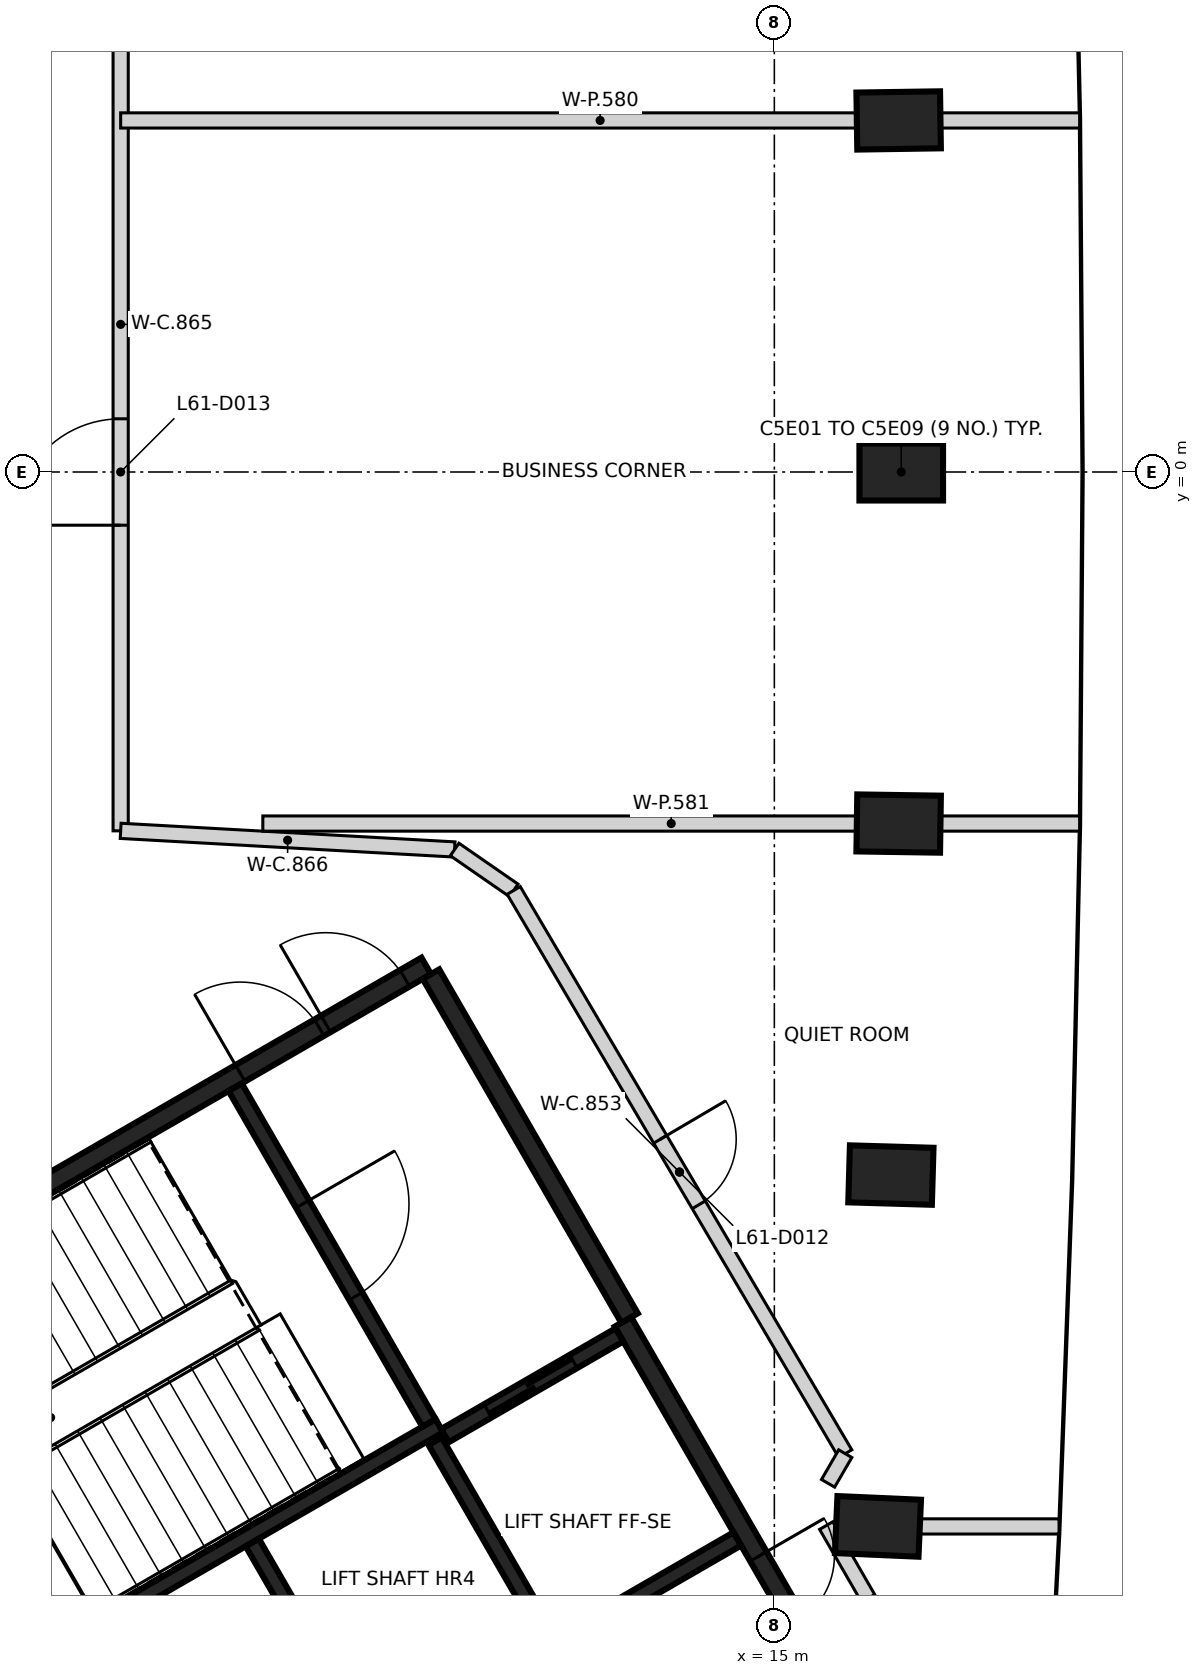
"""IFC4 building model, lengths in metres.
Left out: names, types, materials, properties, quantities, classifications, styles, units other than length and angle.
Written with IfcOpenShell. Run it as: python <this file> out.ifc"""

import sys

from ifc_helpers import new_model, si_unit, direction, frame, frame_2d, origin, origin_2d, place, context, subcontext, project, spatial, rectangle, extrude, element, fill, save


model = new_model("IFC4")
c1 = context("Model", 3, precision=1e-05, world=origin(), true_north=direction((0.0, 1.0)))
c2 = subcontext(c1, "Body", "Model", "MODEL_VIEW")
j1 = project(units=[si_unit("LENGTHUNIT", "METRE"), si_unit("PLANEANGLEUNIT", "RADIAN")], contexts=[c1])
p1 = place(None, origin())
s1 = spatial("IfcSite", under=j1, at=p1, CompositionType="ELEMENT")
p2 = place(p1, origin())
s2 = spatial("IfcBuilding", under=s1, at=p2, CompositionType="ELEMENT")
p3 = place(p2, frame((0.0, 0.0, 243.0)))
s3 = spatial("IfcBuildingStorey", under=s2, at=p3, CompositionType="ELEMENT", Elevation=243.0)
for number, where, z_axis, x_axis in (
    (1, (16.363, -13.872, -0.35), (0.0, 0.0, 1.0), (-0.999, 0.044, 0.0)),
    (2, (16.533, -9.25, -0.35), (0.0, 0.0, 1.0), (-1.0, 0.029, 0.0)),
    (3, (16.635, -4.625, -0.35), (0.0, 0.0, 1.0), (-1.0, 0.015, 0.0)),
    (4, (16.669, 0.0, -0.35), (0.0, 0.0, 1.0), (1.0, 0.0, 0.0)),
    (5, (16.635, 4.625, -0.35), (0.0, 0.0, 1.0), (1.0, 0.015, 0.0)),
):
    element("IfcColumn", number, at=place(p3, frame(where, z_axis=z_axis, x_axis=x_axis)), inside=s3, PredefinedType="COLUMN", context=c2, shape_type="SweptSolid", body=[
        extrude(rectangle(XDim=1.1, YDim=0.75, at=origin_2d()), origin(), (0.0, 0.0, 1.0), 3.6),
    ])
p4 = place(p3, frame((0.417, -12.273, 0.0), z_axis=(0.0, 0.0, 1.0), x_axis=(0.866021906294, 0.500006057782, 0.0)))
e6 = element("IfcWall", 6, at=p4, inside=s3, PredefinedType="SHEAR", context=c2, shape_type="SweptSolid", body=[
    extrude(rectangle(XDim=11.55, YDim=0.25, at=frame_2d((5.775, 0.0))), origin(), (0.0, 0.0, 1.0), 3.25),
])
p5 = place(p4, frame((10.025, 0.0, 0.0)))
e7 = element("IfcOpeningElement", 7, at=p5, cuts=e6, PredefinedType="OPENING", context=c2, shape_type="SweptSolid", body=[
    extrude(rectangle(XDim=1.2, YDim=2.1, at=frame_2d((0.6, 1.05))), frame((0.0, 0.135, 0.0), z_axis=(0.0, -1.0, 0.0), x_axis=(1.0, 0.0, 0.0)), (0.0, 0.0, 1.0), 0.27),
])
p6 = place(p4, frame((8.725, 0.0, 0.0)))
e8 = element("IfcOpeningElement", 8, at=p6, cuts=e6, PredefinedType="OPENING", context=c2, shape_type="SweptSolid", body=[
    extrude(rectangle(XDim=1.2, YDim=2.1, at=frame_2d((0.6, 1.05))), frame((0.0, 0.135, 0.0), z_axis=(0.0, -1.0, 0.0), x_axis=(1.0, 0.0, 0.0)), (0.0, 0.0, 1.0), 0.27),
])
p7 = place(p3, frame((13.008, -11.181, 0.0), z_axis=(0.0, 0.0, 1.0), x_axis=(0.500001955336, -0.866024274868, 0.0)))
e9 = element("IfcWall", 9, at=p7, inside=s3, PredefinedType="SHEAR", context=c2, shape_type="SweptSolid", body=[
    extrude(rectangle(XDim=6.125, YDim=0.25, at=frame_2d((3.062, 0.0))), origin(), (0.0, 0.0, 1.0), 3.25),
])
p8 = place(p7, frame((3.563, 0.0, 0.0)))
e10 = element("IfcOpeningElement", 10, at=p8, cuts=e9, PredefinedType="OPENING", context=c2, shape_type="SweptSolid", body=[
    extrude(rectangle(XDim=1.0, YDim=2.1, at=frame_2d((0.5, 1.05))), frame((0.0, 0.135, 0.0), z_axis=(0.0, -1.0, 0.0), x_axis=(1.0, 0.0, 0.0)), (0.0, 0.0, 1.0), 0.27),
])
p9 = place(p3, frame((10.483, -6.606, 0.0), z_axis=(0.0, 0.0, 1.0), x_axis=(0.49999885962, -0.866026062182, 0.0)))
e11 = element("IfcWall", 11, at=p9, inside=s3, PredefinedType="SHEAR", context=c2, shape_type="SweptSolid", body=[
    extrude(rectangle(XDim=5.225, YDim=0.25, at=frame_2d((2.612, 0.0))), origin(), (0.0, 0.0, 1.0), 3.25),
])
p10 = place(p3, frame((5.419, -15.534, 0.0), z_axis=(0.0, 0.0, 1.0), x_axis=(0.866029065029, 0.499993658486, 0.0)))
e12 = element("IfcWall", 12, at=p10, inside=s3, PredefinedType="SHEAR", context=c2, shape_type="SweptSolid", body=[
    extrude(rectangle(XDim=5.974, YDim=0.2, at=frame_2d((2.987, 0.0))), origin(), (0.0, 0.0, 1.0), 3.25),
])
p11 = place(p3, frame((7.906, -8.094, 0.0), z_axis=(0.0, 0.0, 1.0), x_axis=(0.500027839223, -0.866009330205, 0.0)))
e13 = element("IfcWall", 13, at=p11, inside=s3, PredefinedType="SHEAR", context=c2, shape_type="SweptSolid", body=[
    extrude(rectangle(XDim=5.098, YDim=0.2, at=frame_2d((2.549, 0.0))), origin(), (0.0, 0.0, 1.0), 3.25),
])
p12 = place(p11, frame((1.774, 0.0, 0.0)))
e14 = element("IfcOpeningElement", 14, at=p12, cuts=e13, PredefinedType="OPENING", context=c2, shape_type="SweptSolid", body=[
    extrude(rectangle(XDim=1.4, YDim=2.1, at=frame_2d((0.7, 1.05))), frame((0.0, 0.11, 0.0), z_axis=(0.0, -1.0, 0.0), x_axis=(1.0, 0.0, 0.0)), (0.0, 0.0, 1.0), 0.22),
])
p13 = place(p3, frame((8.132, -14.084, 0.0), z_axis=(0.0, 0.0, 1.0), x_axis=(0.499997778408, -0.866026686418, 0.0)))
e15 = element("IfcWall", 15, at=p13, inside=s3, PredefinedType="SHEAR", context=c2, shape_type="SweptSolid", body=[
    extrude(rectangle(XDim=3.198, YDim=0.2, at=frame_2d((1.599, 0.0))), origin(), (0.0, 0.0, 1.0), 3.25),
])
p14 = place(p3, frame((12.088, -15.437, 0.0), z_axis=(0.0, 0.0, 1.0), x_axis=(-0.500026960575, 0.86600983753, 0.0)))
e16 = element("IfcWall", 16, at=p14, inside=s3, PredefinedType="SHEAR", context=c2, shape_type="SweptSolid", body=[
    extrude(rectangle(XDim=3.1, YDim=0.2, at=frame_2d((1.55, 0.0))), origin(), (0.0, 0.0, 1.0), 3.25),
])
p15 = place(p3, frame((10.666, -12.678, 0.0), z_axis=(0.0, 0.0, 1.0), x_axis=(0.866018407898, 0.500012117035, 0.0)))
e17 = element("IfcWall", 17, at=p15, inside=s3, PredefinedType="SHEAR", context=c2, shape_type="SweptSolid", body=[
    extrude(rectangle(XDim=2.651, YDim=0.2, at=frame_2d((1.325, 0.0))), origin(), (0.0, 0.0, 1.0), 3.25),
])
p16 = place(p15, frame((0.652, 0.0, 0.0)))
e18 = element("IfcOpeningElement", 18, at=p16, cuts=e17, PredefinedType="OPENING", context=c2, shape_type="SweptSolid", body=[
    extrude(rectangle(XDim=1.3, YDim=2.1, at=frame_2d((0.65, 1.05))), frame((0.0, 0.11, 0.0), z_axis=(0.0, -1.0, 0.0), x_axis=(1.0, 0.0, 0.0)), (0.0, 0.0, 1.0), 0.22),
])
p17 = place(p3, frame((14.512, -14.037, 0.0), z_axis=(0.0, 0.0, 1.0), x_axis=(-0.866018407898, -0.500012117035, 0.0)))
e19 = element("IfcWall", 19, at=p17, inside=s3, PredefinedType="SHEAR", context=c2, shape_type="SweptSolid", body=[
    extrude(rectangle(XDim=2.651, YDim=0.2, at=frame_2d((1.325, 0.0))), origin(), (0.0, 0.0, 1.0), 3.25),
])
p18 = place(p3, frame((6.4, -4.721, 0.0), z_axis=(0.0, 0.0, 1.0), x_axis=(0.0, 1.0, 0.0)))
e20 = element("IfcWall", 20, at=p18, inside=s3, PredefinedType="PARTITIONING", context=c2, shape_type="SweptSolid", body=[
    extrude(rectangle(XDim=13.326, YDim=0.2, at=frame_2d((6.663, 0.0))), origin(), (0.0, 0.0, 1.0), 3.25),
])
p19 = place(p18, frame((4.021, 0.0, 0.0)))
e21 = element("IfcOpeningElement", 21, at=p19, cuts=e20, PredefinedType="OPENING", context=c2, shape_type="SweptSolid", body=[
    extrude(rectangle(XDim=1.4, YDim=2.1, at=frame_2d((0.7, 1.05))), frame((0.0, 0.11, 0.0), z_axis=(0.0, -1.0, 0.0), x_axis=(1.0, 0.0, 0.0)), (0.0, 0.0, 1.0), 0.22),
])
p20 = place(p18, frame((10.865, 0.0, 0.0)))
e22 = element("IfcOpeningElement", 22, at=p20, cuts=e20, PredefinedType="OPENING", context=c2, shape_type="SweptSolid", body=[
    extrude(rectangle(XDim=1.0, YDim=2.1, at=frame_2d((0.5, 1.05))), frame((0.0, 0.11, 0.0), z_axis=(0.0, -1.0, 0.0), x_axis=(1.0, 0.0, 0.0)), (0.0, 0.0, 1.0), 0.22),
])
p21 = place(p3, frame((6.4, -4.721, 0.0), z_axis=(0.0, 0.0, 1.0), x_axis=(0.998447007366, -0.055709725208, 0.0)))
e23 = element("IfcWall", 23, at=p21, inside=s3, PredefinedType="PARTITIONING", context=c2, shape_type="SweptSolid", body=[
    extrude(rectangle(XDim=4.4, YDim=0.2, at=frame_2d((2.2, 0.0))), origin(), (0.0, 0.0, 1.0), 3.25),
])
p22 = place(p3, frame((10.794, -4.966, 0.0), z_axis=(0.0, 0.0, 1.0), x_axis=(0.822266583859, -0.569102508401, 0.0)))
e24 = element("IfcWall", 24, at=p22, inside=s3, PredefinedType="PARTITIONING", context=c2, shape_type="SweptSolid", body=[
    extrude(rectangle(XDim=0.945, YDim=0.2, at=frame_2d((0.473, 0.0))), origin(), (0.0, 0.0, 1.0), 3.25),
])
p23 = place(p3, frame((11.571, -5.505, 0.0), z_axis=(0.0, 0.0, 1.0), x_axis=(0.507291838928, -0.861774326699, 0.0)))
e25 = element("IfcWall", 25, at=p23, inside=s3, PredefinedType="PARTITIONING", context=c2, shape_type="SweptSolid", body=[
    extrude(rectangle(XDim=8.599, YDim=0.2, at=frame_2d((4.299, 0.0))), origin(), (0.0, 0.0, 1.0), 3.25),
])
p24 = place(p23, frame((3.799, 0.0, 0.0)))
e26 = element("IfcOpeningElement", 26, at=p24, cuts=e25, PredefinedType="OPENING", context=c2, shape_type="SweptSolid", body=[
    extrude(rectangle(XDim=1.0, YDim=2.1, at=frame_2d((0.5, 1.05))), frame((0.0, 0.11, 0.0), z_axis=(0.0, -1.0, 0.0), x_axis=(1.0, 0.0, 0.0)), (0.0, 0.0, 1.0), 0.22),
])
p25 = place(p3, frame((15.55, -15.213, 0.0), z_axis=(0.0, 0.0, 1.0), x_axis=(0.865989998118, 0.500061319399, 0.0)))
e27 = element("IfcWall", 27, at=p25, inside=s3, PredefinedType="PARTITIONING", context=c2, shape_type="SweptSolid", body=[
    extrude(rectangle(XDim=0.79, YDim=0.2, at=frame_2d((0.395, 0.0))), origin(), (0.0, 0.0, 1.0), 2.35),
])
p26 = place(p3, frame((15.933, -12.915, 0.0), z_axis=(0.0, 0.0, 1.0), x_axis=(-0.502017930819, -0.864857211993, 0.0)))
e28 = element("IfcWall", 28, at=p26, inside=s3, PredefinedType="PARTITIONING", context=c2, shape_type="SweptSolid", body=[
    extrude(rectangle(XDim=0.451, YDim=0.2, at=frame_2d((0.226, 0.0))), origin(), (0.0, 0.0, 1.0), 3.25),
])
p27 = place(p3, frame((15.682, -13.861, 0.0), z_axis=(0.0, 0.0, 1.0), x_axis=(0.499633176362, -0.866237085952, 0.0)))
e29 = element("IfcWall", 29, at=p27, inside=s3, PredefinedType="PARTITIONING", context=c2, shape_type="SweptSolid", body=[
    extrude(rectangle(XDim=1.105, YDim=0.2, at=frame_2d((0.552, 0.0))), origin(), (0.0, 0.0, 1.0), 2.35),
])
p28 = place(p3, frame((6.4, 4.625, 0.0), z_axis=(0.0, 0.0, 1.0), x_axis=(1.0, 0.0, 0.0)))
e30 = element("IfcWall", 30, at=p28, inside=s3, PredefinedType="PARTITIONING", context=c2, shape_type="SweptSolid", body=[
    extrude(rectangle(XDim=12.616, YDim=0.2, at=frame_2d((6.308, 0.0))), origin(), (0.0, 0.0, 1.0), 3.25),
])
p29 = place(p3, frame((8.27, -4.625, 0.0), z_axis=(0.0, 0.0, 1.0), x_axis=(1.0, 0.0, 0.0)))
e31 = element("IfcWall", 31, at=p29, inside=s3, PredefinedType="PARTITIONING", context=c2, shape_type="SweptSolid", body=[
    extrude(rectangle(XDim=10.746, YDim=0.2, at=frame_2d((5.373, 0.0))), origin(), (0.0, 0.0, 1.0), 3.25),
])
p30 = place(p3, frame((18.746, -13.872, 0.0), z_axis=(0.0, 0.0, 1.0), x_axis=(-1.0, 0.0, 0.0)))
e32 = element("IfcWall", 32, at=p30, inside=s3, PredefinedType="PARTITIONING", context=c2, shape_type="SweptSolid", body=[
    extrude(rectangle(XDim=2.711, YDim=0.2, at=frame_2d((1.356, 0.0))), origin(), (0.0, 0.0, 1.0), 3.25),
])
p31 = place(p16, origin())
e33 = element("IfcDoor", 33, at=p31, inside=s3, OperationType="SLIDING_TO_LEFT", PredefinedType="DOOR", context=c2, shape_type="SweptSolid", body=[
    extrude(rectangle(XDim=1.3, YDim=2.1, at=frame_2d((0.65, 1.05))), frame((0.0, 0.025, 0.0), z_axis=(0.0, -1.0, 0.0), x_axis=(1.0, 0.0, 0.0)), (0.0, 0.0, 1.0), 0.05),
])
fill(e18, e33)
p32 = place(p8, origin())
e34 = element("IfcDoor", 34, at=p32, inside=s3, OperationType="SINGLE_SWING_LEFT", PredefinedType="DOOR", context=c2, shape_type="SweptSolid", body=[
    extrude(rectangle(XDim=1.0, YDim=2.1, at=frame_2d((0.5, 1.05))), frame((0.0, 0.025, 0.0), z_axis=(0.0, -1.0, 0.0), x_axis=(1.0, 0.0, 0.0)), (0.0, 0.0, 1.0), 0.05),
])
fill(e10, e34)
p33 = place(p5, origin())
e35 = element("IfcDoor", 35, at=p33, inside=s3, OperationType="SINGLE_SWING_LEFT", PredefinedType="DOOR", context=c2, shape_type="SweptSolid", body=[
    extrude(rectangle(XDim=1.2, YDim=2.1, at=frame_2d((0.6, 1.05))), frame((0.0, 0.025, 0.0), z_axis=(0.0, -1.0, 0.0), x_axis=(1.0, 0.0, 0.0)), (0.0, 0.0, 1.0), 0.05),
])
fill(e7, e35)
p34 = place(p6, origin())
e36 = element("IfcDoor", 36, at=p34, inside=s3, OperationType="SINGLE_SWING_RIGHT", PredefinedType="DOOR", context=c2, shape_type="SweptSolid", body=[
    extrude(rectangle(XDim=1.2, YDim=2.1, at=frame_2d((0.6, 1.05))), frame((0.0, 0.025, 0.0), z_axis=(0.0, -1.0, 0.0), x_axis=(1.0, 0.0, 0.0)), (0.0, 0.0, 1.0), 0.05),
])
fill(e8, e36)
p35 = place(p12, origin())
e37 = element("IfcDoor", 37, at=p35, inside=s3, OperationType="SINGLE_SWING_LEFT", PredefinedType="DOOR", context=c2, shape_type="SweptSolid", body=[
    extrude(rectangle(XDim=1.4, YDim=2.1, at=frame_2d((0.7, 1.05))), frame((0.0, 0.025, 0.0), z_axis=(0.0, -1.0, 0.0), x_axis=(1.0, 0.0, 0.0)), (0.0, 0.0, 1.0), 0.05),
])
fill(e14, e37)
p36 = place(p24, origin())
e38 = element("IfcDoor", 38, at=p36, inside=s3, OperationType="SINGLE_SWING_LEFT", PredefinedType="DOOR", context=c2, shape_type="SweptSolid", body=[
    extrude(rectangle(XDim=1.0, YDim=2.1, at=frame_2d((0.5, 1.05))), frame((0.0, 0.025, 0.0), z_axis=(0.0, -1.0, 0.0), x_axis=(1.0, 0.0, 0.0)), (0.0, 0.0, 1.0), 0.05),
])
fill(e26, e38)
p37 = place(p19, frame((1.4, 0.0, 0.0), z_axis=(0.0, 0.0, 1.0), x_axis=(-1.0, 0.0, 0.0)))
e39 = element("IfcDoor", 39, at=p37, inside=s3, OperationType="DOUBLE_DOOR_SINGLE_SWING", PredefinedType="DOOR", context=c2, shape_type="SweptSolid", body=[
    extrude(rectangle(XDim=1.4, YDim=2.1, at=frame_2d((0.7, 1.05))), frame((0.0, 0.025, 0.0), z_axis=(0.0, -1.0, 0.0), x_axis=(1.0, 0.0, 0.0)), (0.0, 0.0, 1.0), 0.05),
])
fill(e21, e39)
save(model, sys.argv[1])
